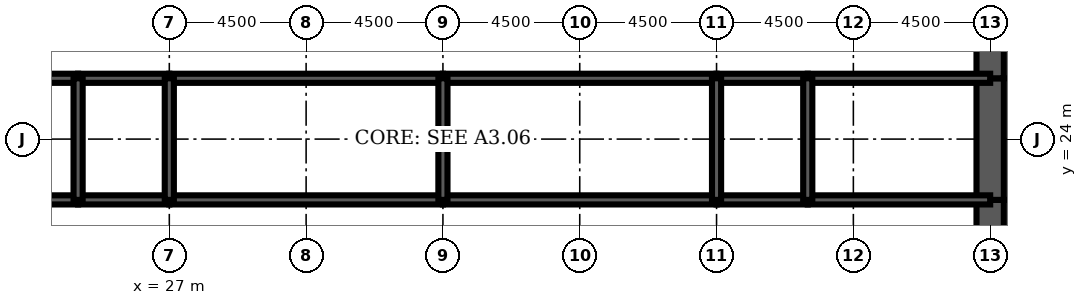
"""IFC4 building model, lengths in metres.
Left out: names, types, materials, properties, quantities, classifications, styles, units other than length and angle.
Written with IfcOpenShell. Run it as: python <this file> out.ifc"""

import sys

from ifc_helpers import new_model, si_unit, direction, frame, frame_2d, origin, place, context, subcontext, project, spatial, rectangle, extrude, element, fill, save


model = new_model("IFC4")
c1 = context("Model", 3, precision=1e-05, world=origin(), true_north=direction((0.0, 1.0)))
c2 = subcontext(c1, "Body", "Model", "MODEL_VIEW")
j1 = project(units=[si_unit("LENGTHUNIT", "METRE"), si_unit("PLANEANGLEUNIT", "RADIAN")], contexts=[c1])
p1 = place(None, origin())
s1 = spatial("IfcSite", under=j1, at=p1, CompositionType="ELEMENT")
p2 = place(p1, origin())
s2 = spatial("IfcBuilding", under=s1, at=p2, CompositionType="ELEMENT")
p3 = place(p2, frame((0.0, 0.0, 23.0)))
s3 = spatial("IfcBuildingStorey", under=s2, at=p3, CompositionType="ELEMENT", Elevation=23.0)
p4 = place(p3, frame((54.0, 19.2, 0.0), z_axis=(0.0, 0.0, 1.0), x_axis=(0.0, 1.0, 0.0)))
e1 = element("IfcWall", 1, at=p4, inside=s3, PredefinedType="SHEAR", context=c2, shape_type="SweptSolid", body=[
    extrude(rectangle(XDim=2.8, YDim=0.9, at=frame_2d((1.4, 0.0))), origin(), (0.0, 0.0, 1.0), 4.5),
])
p5 = place(p4, frame((0.4, 0.0, 0.0)))
e2 = element("IfcOpeningElement", 2, at=p5, cuts=e1, PredefinedType="OPENING", context=c2, shape_type="SweptSolid", body=[
    extrude(rectangle(XDim=1.8, YDim=2.1, at=frame_2d((0.9, 1.05))), frame((0.0, 0.46, 0.0), z_axis=(0.0, -1.0, 0.0), x_axis=(1.0, 0.0, 0.0)), (0.0, 0.0, 1.0), 0.92),
])
p6 = place(p3, frame((54.0, 22.0, 0.0), z_axis=(0.0, 0.0, 1.0), x_axis=(0.0, 1.0, 0.0)))
e3 = element("IfcWall", 3, at=p6, inside=s3, PredefinedType="SHEAR", context=c2, shape_type="SweptSolid", body=[
    extrude(rectangle(XDim=4.0, YDim=0.9, at=frame_2d((2.0, 0.0))), origin(), (0.0, 0.0, 1.0), 4.5),
])
p7 = place(p3, frame((54.0, 26.0, 0.0), z_axis=(0.0, 0.0, 1.0), x_axis=(0.0, 1.0, 0.0)))
e4 = element("IfcWall", 4, at=p7, inside=s3, PredefinedType="SHEAR", context=c2, shape_type="SweptSolid", body=[
    extrude(rectangle(XDim=2.8, YDim=0.9, at=frame_2d((1.4, 0.0))), origin(), (0.0, 0.0, 1.0), 4.5),
])
p8 = place(p7, frame((0.6, 0.0, 0.0)))
e5 = element("IfcOpeningElement", 5, at=p8, cuts=e4, PredefinedType="OPENING", context=c2, shape_type="SweptSolid", body=[
    extrude(rectangle(XDim=1.8, YDim=2.1, at=frame_2d((0.9, 1.05))), frame((0.0, 0.46, 0.0), z_axis=(0.0, -1.0, 0.0), x_axis=(1.0, 0.0, 0.0)), (0.0, 0.0, 1.0), 0.92),
])
p9 = place(p3, frame((18.0, 22.0, 0.0), z_axis=(0.0, 0.0, 1.0), x_axis=(1.0, 0.0, 0.0)))
e6 = element("IfcWall", 6, at=p9, inside=s3, PredefinedType="SOLIDWALL", context=c2, shape_type="SweptSolid", body=[
    extrude(rectangle(XDim=6.0, YDim=0.3, at=frame_2d((3.0, 0.0))), origin(), (0.0, 0.0, 1.0), 4.5),
])
p10 = place(p9, frame((4.4, 0.0, 0.0)))
e7 = element("IfcOpeningElement", 7, at=p10, cuts=e6, PredefinedType="OPENING", context=c2, shape_type="SweptSolid", body=[
    extrude(rectangle(XDim=1.0, YDim=2.1, at=frame_2d((0.5, 1.05))), frame((0.0, 0.16, 0.0), z_axis=(0.0, -1.0, 0.0), x_axis=(1.0, 0.0, 0.0)), (0.0, 0.0, 1.0), 0.32),
])
p11 = place(p9, frame((0.7, 0.0, 0.0)))
e8 = element("IfcOpeningElement", 8, at=p11, cuts=e6, PredefinedType="OPENING", context=c2, shape_type="SweptSolid", body=[
    extrude(rectangle(XDim=1.0, YDim=2.1, at=frame_2d((0.5, 1.05))), frame((0.0, 0.16, 0.0), z_axis=(0.0, -1.0, 0.0), x_axis=(1.0, 0.0, 0.0)), (0.0, 0.0, 1.0), 0.32),
])
p12 = place(p3, frame((24.0, 22.0, 0.0), z_axis=(0.0, 0.0, 1.0), x_axis=(1.0, 0.0, 0.0)))
e9 = element("IfcWall", 9, at=p12, inside=s3, PredefinedType="SOLIDWALL", context=c2, shape_type="SweptSolid", body=[
    extrude(rectangle(XDim=3.0, YDim=0.3, at=frame_2d((1.5, 0.0))), origin(), (0.0, 0.0, 1.0), 4.5),
])
p13 = place(p12, frame((1.0, 0.0, 0.0)))
e10 = element("IfcOpeningElement", 10, at=p13, cuts=e9, PredefinedType="OPENING", context=c2, shape_type="SweptSolid", body=[
    extrude(rectangle(XDim=1.0, YDim=2.1, at=frame_2d((0.5, 1.05))), frame((0.0, 0.16, 0.0), z_axis=(0.0, -1.0, 0.0), x_axis=(1.0, 0.0, 0.0)), (0.0, 0.0, 1.0), 0.32),
])
p14 = place(p3, frame((27.0, 22.0, 0.0), z_axis=(0.0, 0.0, 1.0), x_axis=(1.0, 0.0, 0.0)))
e11 = element("IfcWall", 11, at=p14, inside=s3, PredefinedType="SOLIDWALL", context=c2, shape_type="SweptSolid", body=[
    extrude(rectangle(XDim=9.0, YDim=0.3, at=frame_2d((4.5, 0.0))), origin(), (0.0, 0.0, 1.0), 4.5),
])
p15 = place(p14, frame((4.0, 0.0, 0.0)))
e12 = element("IfcOpeningElement", 12, at=p15, cuts=e11, PredefinedType="OPENING", context=c2, shape_type="SweptSolid", body=[
    extrude(rectangle(XDim=1.0, YDim=2.1, at=frame_2d((0.5, 1.05))), frame((0.0, 0.16, 0.0), z_axis=(0.0, -1.0, 0.0), x_axis=(1.0, 0.0, 0.0)), (0.0, 0.0, 1.0), 0.32),
])
p16 = place(p3, frame((36.0, 22.0, 0.0), z_axis=(0.0, 0.0, 1.0), x_axis=(1.0, 0.0, 0.0)))
e13 = element("IfcWall", 13, at=p16, inside=s3, PredefinedType="SOLIDWALL", context=c2, shape_type="SweptSolid", body=[
    extrude(rectangle(XDim=9.0, YDim=0.3, at=frame_2d((4.5, 0.0))), origin(), (0.0, 0.0, 1.0), 4.5),
])
p17 = place(p16, frame((4.0, 0.0, 0.0)))
e14 = element("IfcOpeningElement", 14, at=p17, cuts=e13, PredefinedType="OPENING", context=c2, shape_type="SweptSolid", body=[
    extrude(rectangle(XDim=1.0, YDim=2.1, at=frame_2d((0.5, 1.05))), frame((0.0, 0.16, 0.0), z_axis=(0.0, -1.0, 0.0), x_axis=(1.0, 0.0, 0.0)), (0.0, 0.0, 1.0), 0.32),
])
p18 = place(p3, frame((45.0, 22.0, 0.0), z_axis=(0.0, 0.0, 1.0), x_axis=(1.0, 0.0, 0.0)))
e15 = element("IfcWall", 15, at=p18, inside=s3, PredefinedType="SOLIDWALL", context=c2, shape_type="SweptSolid", body=[
    extrude(rectangle(XDim=3.0, YDim=0.3, at=frame_2d((1.5, 0.0))), origin(), (0.0, 0.0, 1.0), 4.5),
])
p19 = place(p18, frame((1.0, 0.0, 0.0)))
e16 = element("IfcOpeningElement", 16, at=p19, cuts=e15, PredefinedType="OPENING", context=c2, shape_type="SweptSolid", body=[
    extrude(rectangle(XDim=1.0, YDim=2.1, at=frame_2d((0.5, 1.05))), frame((0.0, 0.16, 0.0), z_axis=(0.0, -1.0, 0.0), x_axis=(1.0, 0.0, 0.0)), (0.0, 0.0, 1.0), 0.32),
])
p20 = place(p3, frame((48.0, 22.0, 0.0), z_axis=(0.0, 0.0, 1.0), x_axis=(1.0, 0.0, 0.0)))
e17 = element("IfcWall", 17, at=p20, inside=s3, PredefinedType="SOLIDWALL", context=c2, shape_type="SweptSolid", body=[
    extrude(rectangle(XDim=6.0, YDim=0.3, at=frame_2d((3.0, 0.0))), origin(), (0.0, 0.0, 1.0), 4.5),
])
p21 = place(p20, frame((2.0, 0.0, 0.0)))
e18 = element("IfcOpeningElement", 18, at=p21, cuts=e17, PredefinedType="OPENING", context=c2, shape_type="SweptSolid", body=[
    extrude(rectangle(XDim=1.0, YDim=2.1, at=frame_2d((0.5, 1.05))), frame((0.0, 0.16, 0.0), z_axis=(0.0, -1.0, 0.0), x_axis=(1.0, 0.0, 0.0)), (0.0, 0.0, 1.0), 0.32),
])
p22 = place(p20, frame((4.0, 0.0, 0.0)))
e19 = element("IfcOpeningElement", 19, at=p22, cuts=e17, PredefinedType="OPENING", context=c2, shape_type="SweptSolid", body=[
    extrude(rectangle(XDim=1.0, YDim=2.1, at=frame_2d((0.5, 1.05))), frame((0.0, 0.16, 0.0), z_axis=(0.0, -1.0, 0.0), x_axis=(1.0, 0.0, 0.0)), (0.0, 0.0, 1.0), 0.32),
])
p23 = place(p3, frame((18.0, 26.0, 0.0), z_axis=(0.0, 0.0, 1.0), x_axis=(1.0, 0.0, 0.0)))
e20 = element("IfcWall", 20, at=p23, inside=s3, PredefinedType="SOLIDWALL", context=c2, shape_type="SweptSolid", body=[
    extrude(rectangle(XDim=6.0, YDim=0.3, at=frame_2d((3.0, 0.0))), origin(), (0.0, 0.0, 1.0), 4.5),
])
p24 = place(p3, frame((24.0, 26.0, 0.0), z_axis=(0.0, 0.0, 1.0), x_axis=(1.0, 0.0, 0.0)))
e21 = element("IfcWall", 21, at=p24, inside=s3, PredefinedType="SOLIDWALL", context=c2, shape_type="SweptSolid", body=[
    extrude(rectangle(XDim=3.0, YDim=0.3, at=frame_2d((1.5, 0.0))), origin(), (0.0, 0.0, 1.0), 4.5),
])
for number, where, z_axis, x_axis in (
    (22, (27.0, 26.0, 0.0), (0.0, 0.0, 1.0), (1.0, 0.0, 0.0)),
    (23, (36.0, 26.0, 0.0), (0.0, 0.0, 1.0), (1.0, 0.0, 0.0)),
):
    element("IfcWall", number, at=place(p3, frame(where, z_axis=z_axis, x_axis=x_axis)), inside=s3, PredefinedType="SOLIDWALL", context=c2, shape_type="SweptSolid", body=[
        extrude(rectangle(XDim=9.0, YDim=0.3, at=frame_2d((4.5, 0.0))), origin(), (0.0, 0.0, 1.0), 4.5),
    ])
p25 = place(p3, frame((45.0, 26.0, 0.0), z_axis=(0.0, 0.0, 1.0), x_axis=(1.0, 0.0, 0.0)))
e24 = element("IfcWall", 24, at=p25, inside=s3, PredefinedType="SOLIDWALL", context=c2, shape_type="SweptSolid", body=[
    extrude(rectangle(XDim=3.0, YDim=0.3, at=frame_2d((1.5, 0.0))), origin(), (0.0, 0.0, 1.0), 4.5),
])
p26 = place(p3, frame((48.0, 26.0, 0.0), z_axis=(0.0, 0.0, 1.0), x_axis=(1.0, 0.0, 0.0)))
e25 = element("IfcWall", 25, at=p26, inside=s3, PredefinedType="SOLIDWALL", context=c2, shape_type="SweptSolid", body=[
    extrude(rectangle(XDim=6.0, YDim=0.3, at=frame_2d((3.0, 0.0))), origin(), (0.0, 0.0, 1.0), 4.5),
])
for number, where, z_axis, x_axis in (
    (26, (24.0, 22.0, 0.0), (0.0, 0.0, 1.0), (0.0, 1.0, 0.0)),
    (27, (27.0, 22.0, 0.0), (0.0, 0.0, 1.0), (0.0, 1.0, 0.0)),
    (28, (36.0, 22.0, 0.0), (0.0, 0.0, 1.0), (0.0, 1.0, 0.0)),
    (29, (45.0, 22.0, 0.0), (0.0, 0.0, 1.0), (0.0, 1.0, 0.0)),
    (30, (48.0, 22.0, 0.0), (0.0, 0.0, 1.0), (0.0, 1.0, 0.0)),
):
    element("IfcWall", number, at=place(p3, frame(where, z_axis=z_axis, x_axis=x_axis)), inside=s3, PredefinedType="SOLIDWALL", context=c2, shape_type="SweptSolid", body=[
        extrude(rectangle(XDim=4.0, YDim=0.3, at=frame_2d((2.0, 0.0))), origin(), (0.0, 0.0, 1.0), 4.5),
    ])
p27 = place(p3, frame((38.0, 22.15, 0.0), z_axis=(0.0, 0.0, 1.0), x_axis=(0.0, 1.0, 0.0)))
e31 = element("IfcWall", 31, at=p27, inside=s3, PredefinedType="PARTITIONING", context=c2, shape_type="SweptSolid", body=[
    extrude(rectangle(XDim=3.7, YDim=0.15, at=frame_2d((1.85, 0.0))), origin(), (0.0, 0.0, 1.0), 3.0),
])
p28 = place(p27, frame((2.2, 0.0, 0.0)))
e32 = element("IfcOpeningElement", 32, at=p28, cuts=e31, PredefinedType="OPENING", context=c2, shape_type="SweptSolid", body=[
    extrude(rectangle(XDim=1.0, YDim=2.1, at=frame_2d((0.5, 1.05))), frame((0.0, 0.085, 0.0), z_axis=(0.0, -1.0, 0.0), x_axis=(1.0, 0.0, 0.0)), (0.0, 0.0, 1.0), 0.17),
])
p29 = place(p3, frame((51.375, 22.15, 0.0), z_axis=(0.0, 0.0, 1.0), x_axis=(0.0, 1.0, 0.0)))
e33 = element("IfcWall", 33, at=p29, inside=s3, PredefinedType="PARTITIONING", context=c2, shape_type="SweptSolid", body=[
    extrude(rectangle(XDim=3.7, YDim=0.15, at=frame_2d((1.85, 0.0))), origin(), (0.0, 0.0, 1.0), 3.0),
])
p30 = place(p28, origin())
e34 = element("IfcDoor", 34, at=p30, inside=s3, OperationType="SINGLE_SWING_RIGHT", PredefinedType="DOOR", context=c2, shape_type="SweptSolid", body=[
    extrude(rectangle(XDim=1.0, YDim=2.1, at=frame_2d((0.5, 1.05))), frame((0.0, 0.025, 0.0), z_axis=(0.0, -1.0, 0.0), x_axis=(1.0, 0.0, 0.0)), (0.0, 0.0, 1.0), 0.05),
])
fill(e32, e34)
p31 = place(p5, origin())
e35 = element("IfcDoor", 35, at=p31, inside=s3, OperationType="SINGLE_SWING_LEFT", PredefinedType="DOOR", context=c2, shape_type="SweptSolid", body=[
    extrude(rectangle(XDim=1.8, YDim=2.1, at=frame_2d((0.9, 1.05))), frame((0.0, 0.45, 0.0), z_axis=(0.0, -1.0, 0.0), x_axis=(1.0, 0.0, 0.0)), (0.0, 0.0, 1.0), 0.899),
])
fill(e2, e35)
p32 = place(p8, origin())
e36 = element("IfcDoor", 36, at=p32, inside=s3, OperationType="SINGLE_SWING_LEFT", PredefinedType="DOOR", context=c2, shape_type="SweptSolid", body=[
    extrude(rectangle(XDim=1.8, YDim=2.1, at=frame_2d((0.9, 1.05))), frame((0.0, 0.45, 0.0), z_axis=(0.0, -1.0, 0.0), x_axis=(1.0, 0.0, 0.0)), (0.0, 0.0, 1.0), 0.899),
])
fill(e5, e36)
p33 = place(p10, origin())
e37 = element("IfcDoor", 37, at=p33, inside=s3, OperationType="SINGLE_SWING_RIGHT", PredefinedType="DOOR", context=c2, shape_type="SweptSolid", body=[
    extrude(rectangle(XDim=1.0, YDim=2.1, at=frame_2d((0.5, 1.05))), frame((0.0, 0.025, 0.0), z_axis=(0.0, -1.0, 0.0), x_axis=(1.0, 0.0, 0.0)), (0.0, 0.0, 1.0), 0.05),
])
fill(e7, e37)
p34 = place(p13, origin())
e38 = element("IfcDoor", 38, at=p34, inside=s3, OperationType="SINGLE_SWING_LEFT", PredefinedType="DOOR", context=c2, shape_type="SweptSolid", body=[
    extrude(rectangle(XDim=1.0, YDim=2.1, at=frame_2d((0.5, 1.05))), frame((0.0, 0.025, 0.0), z_axis=(0.0, -1.0, 0.0), x_axis=(1.0, 0.0, 0.0)), (0.0, 0.0, 1.0), 0.05),
])
fill(e10, e38)
p35 = place(p15, origin())
e39 = element("IfcDoor", 39, at=p35, inside=s3, OperationType="SINGLE_SWING_LEFT", PredefinedType="DOOR", context=c2, shape_type="SweptSolid", body=[
    extrude(rectangle(XDim=1.0, YDim=2.1, at=frame_2d((0.5, 1.05))), frame((0.0, 0.025, 0.0), z_axis=(0.0, -1.0, 0.0), x_axis=(1.0, 0.0, 0.0)), (0.0, 0.0, 1.0), 0.05),
])
fill(e12, e39)
p36 = place(p17, origin())
e40 = element("IfcDoor", 40, at=p36, inside=s3, OperationType="SINGLE_SWING_LEFT", PredefinedType="DOOR", context=c2, shape_type="SweptSolid", body=[
    extrude(rectangle(XDim=1.0, YDim=2.1, at=frame_2d((0.5, 1.05))), frame((0.0, 0.025, 0.0), z_axis=(0.0, -1.0, 0.0), x_axis=(1.0, 0.0, 0.0)), (0.0, 0.0, 1.0), 0.05),
])
fill(e14, e40)
p37 = place(p19, origin())
e41 = element("IfcDoor", 41, at=p37, inside=s3, OperationType="SINGLE_SWING_LEFT", PredefinedType="DOOR", context=c2, shape_type="SweptSolid", body=[
    extrude(rectangle(XDim=1.0, YDim=2.1, at=frame_2d((0.5, 1.05))), frame((0.0, 0.025, 0.0), z_axis=(0.0, -1.0, 0.0), x_axis=(1.0, 0.0, 0.0)), (0.0, 0.0, 1.0), 0.05),
])
fill(e16, e41)
p38 = place(p21, origin())
e42 = element("IfcDoor", 42, at=p38, inside=s3, OperationType="SINGLE_SWING_LEFT", PredefinedType="DOOR", context=c2, shape_type="SweptSolid", body=[
    extrude(rectangle(XDim=1.0, YDim=2.1, at=frame_2d((0.5, 1.05))), frame((0.0, 0.025, 0.0), z_axis=(0.0, -1.0, 0.0), x_axis=(1.0, 0.0, 0.0)), (0.0, 0.0, 1.0), 0.05),
])
fill(e18, e42)
p39 = place(p22, origin())
e43 = element("IfcDoor", 43, at=p39, inside=s3, OperationType="SINGLE_SWING_RIGHT", PredefinedType="DOOR", context=c2, shape_type="SweptSolid", body=[
    extrude(rectangle(XDim=1.0, YDim=2.1, at=frame_2d((0.5, 1.05))), frame((0.0, 0.025, 0.0), z_axis=(0.0, -1.0, 0.0), x_axis=(1.0, 0.0, 0.0)), (0.0, 0.0, 1.0), 0.05),
])
fill(e19, e43)
save(model, sys.argv[1])
